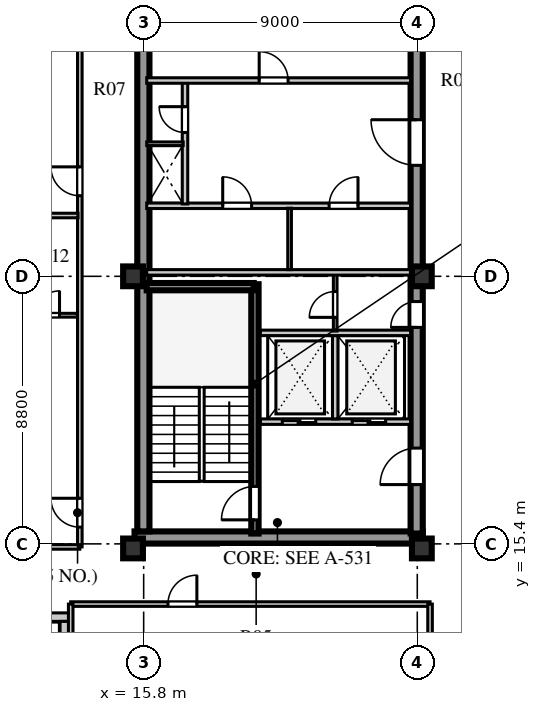
"""IFC4 building model, lengths in metres.
Left out: names, types, materials, properties, quantities, classifications, styles, units other than length and angle.
Written with IfcOpenShell. Run it as: python <this file> out.ifc"""

import sys

from ifc_helpers import new_model, si_unit, direction, frame, frame_2d, origin, origin_2d, place, context, subcontext, project, spatial, rectangle, extrude, element, fill, save


model = new_model("IFC4")
c1 = context("Model", 3, precision=1e-05, world=origin(), true_north=direction((0.0, 1.0)))
c2 = subcontext(c1, "Body", "Model", "MODEL_VIEW")
j1 = project(units=[si_unit("LENGTHUNIT", "METRE"), si_unit("PLANEANGLEUNIT", "RADIAN")], contexts=[c1])
p1 = place(None, origin())
s1 = spatial("IfcSite", under=j1, at=p1, CompositionType="ELEMENT")
p2 = place(p1, origin())
s2 = spatial("IfcBuilding", under=s1, at=p2, CompositionType="ELEMENT")
p3 = place(p2, frame((0.0, 0.0, 237.5)))
s3 = spatial("IfcBuildingStorey", under=s2, at=p3, CompositionType="ELEMENT", Elevation=237.5)
p4 = place(p3, frame((15.5, 15.61, 0.0), z_axis=(0.0, 0.0, 1.0), x_axis=(1.0, 0.0, 0.0)))
e1 = element("IfcWall", 1, at=p4, inside=s3, PredefinedType="SHEAR", context=c2, shape_type="SweptSolid", body=[
    extrude(rectangle(XDim=9.48, YDim=0.4, at=frame_2d((4.74, 0.0))), origin(), (0.0, 0.0, 1.0), 3.66),
])
p5 = place(p3, frame((15.79, 15.81, 0.0), z_axis=(0.0, 0.0, 1.0), x_axis=(0.0, 1.0, 0.0)))
e2 = element("IfcWall", 2, at=p5, inside=s3, PredefinedType="SHEAR", context=c2, shape_type="SweptSolid", body=[
    extrude(rectangle(XDim=25.63, YDim=0.4, at=frame_2d((12.815, 0.0))), origin(), (0.0, 0.0, 1.0), 3.66),
])
p6 = place(p3, frame((24.78, 15.74, 0.0), z_axis=(0.0, 0.0, 1.0), x_axis=(0.0, 1.0, 0.0)))
e3 = element("IfcWall", 3, at=p6, inside=s3, PredefinedType="SHEAR", context=c2, shape_type="SweptSolid", body=[
    extrude(rectangle(XDim=25.76, YDim=0.4, at=frame_2d((12.88, 0.0))), origin(), (0.0, 0.0, 1.0), 3.66),
])
p7 = place(p6, frame((1.61, 0.0, 0.0)))
e4 = element("IfcOpeningElement", 4, at=p7, cuts=e3, PredefinedType="OPENING", context=c2, shape_type="SweptSolid", body=[
    extrude(rectangle(XDim=1.2, YDim=2.1, at=frame_2d((0.6, 1.05))), frame((0.0, 0.21, 0.0), z_axis=(0.0, -1.0, 0.0), x_axis=(1.0, 0.0, 0.0)), (0.0, 0.0, 1.0), 0.42),
])
p8 = place(p6, frame((6.78, 0.0, 0.0)))
e5 = element("IfcOpeningElement", 5, at=p8, cuts=e3, PredefinedType="OPENING", context=c2, shape_type="SweptSolid", body=[
    extrude(rectangle(XDim=0.85, YDim=2.06, at=frame_2d((0.425, 1.03))), frame((0.0, 0.21, 0.0), z_axis=(0.0, -1.0, 0.0), x_axis=(1.0, 0.0, 0.0)), (0.0, 0.0, 1.0), 0.42),
])
p9 = place(p6, frame((12.11, 0.0, 0.0)))
e6 = element("IfcOpeningElement", 6, at=p9, cuts=e3, PredefinedType="OPENING", context=c2, shape_type="SweptSolid", body=[
    extrude(rectangle(XDim=1.5, YDim=2.12, at=frame_2d((0.75, 1.06))), frame((0.0, 0.21, 0.0), z_axis=(0.0, -1.0, 0.0), x_axis=(1.0, 0.0, 0.0)), (0.0, 0.0, 1.0), 0.42),
])
p10 = place(p6, frame((20.11, 0.0, 0.0)))
e7 = element("IfcOpeningElement", 7, at=p10, cuts=e3, PredefinedType="OPENING", context=c2, shape_type="SweptSolid", body=[
    extrude(rectangle(XDim=1.2, YDim=2.12, at=frame_2d((0.6, 1.06))), frame((0.0, 0.21, 0.0), z_axis=(0.0, -1.0, 0.0), x_axis=(1.0, 0.0, 0.0)), (0.0, 0.0, 1.0), 0.42),
])
p11 = place(p6, frame((24.01, 0.0, 0.0)))
e8 = element("IfcOpeningElement", 8, at=p11, cuts=e3, PredefinedType="OPENING", context=c2, shape_type="SweptSolid", body=[
    extrude(rectangle(XDim=0.95, YDim=2.1, at=frame_2d((0.475, 1.05))), frame((0.0, 0.21, 0.0), z_axis=(0.0, -1.0, 0.0), x_axis=(1.0, 0.0, 0.0)), (0.0, 0.0, 1.0), 0.42),
])
for number, where, z_axis, x_axis in (
    (9, (15.45, 15.25, 0.0), (0.0, 0.0, 1.0), (1.0, 0.0, 0.0)),
    (10, (15.45, 24.2, 0.0), (0.0, 0.0, 1.0), (1.0, 0.0, 0.0)),
    (11, (24.95, 15.25, 0.0), (0.0, 0.0, 1.0), (1.0, 0.0, 0.0)),
    (12, (24.95, 24.2, 0.0), (0.0, 0.0, 1.0), (1.0, 0.0, 0.0)),
):
    element("IfcColumn", number, at=place(p3, frame(where, z_axis=z_axis, x_axis=x_axis)), inside=s3, PredefinedType="COLUMN", context=c2, shape_type="SweptSolid", body=[
        extrude(rectangle(XDim=0.65, YDim=0.65, at=origin_2d()), origin(), (0.0, 0.0, 1.0), 3.66),
    ])
p12 = place(p3, frame((7.8, 12.99, 0.0), z_axis=(0.0, 0.0, 1.0), x_axis=(1.0, 0.0, 0.0)))
e13 = element("IfcWall", 13, at=p12, inside=s3, PredefinedType="STANDARD", context=c2, shape_type="SweptSolid", body=[
    extrude(rectangle(XDim=5.53, YDim=0.28, at=frame_2d((2.765, 0.0))), origin(), (0.0, 0.0, 1.0), 3.66),
])
p13 = place(p3, frame((13.19, 12.85, 0.0), z_axis=(0.0, 0.0, 1.0), x_axis=(0.0, -1.0, 0.0)))
e14 = element("IfcWall", 14, at=p13, inside=s3, PredefinedType="STANDARD", context=c2, shape_type="SweptSolid", body=[
    extrude(rectangle(XDim=4.97, YDim=0.28, at=frame_2d((2.485, 0.0))), origin(), (0.0, 0.0, 1.0), 3.66),
])
p14 = place(p3, frame((19.46, 15.74, 0.0), z_axis=(0.0, 0.0, 1.0), x_axis=(0.0, 1.0, 0.0)))
e15 = element("IfcWall", 15, at=p14, inside=s3, PredefinedType="SHEAR", context=c2, shape_type="SweptSolid", body=[
    extrude(rectangle(XDim=8.2, YDim=0.24, at=frame_2d((4.1, 0.0))), origin(), (0.0, 0.0, 1.0), 3.9),
])
p15 = place(p14, frame((0.45, 0.0, 0.0)))
e16 = element("IfcOpeningElement", 16, at=p15, cuts=e15, PredefinedType="OPENING", context=c2, shape_type="SweptSolid", body=[
    extrude(rectangle(XDim=1.1, YDim=2.1, at=frame_2d((0.55, 1.05))), frame((0.0, 0.13, 0.0), z_axis=(0.0, -1.0, 0.0), x_axis=(1.0, 0.0, 0.0)), (0.0, 0.0, 1.0), 0.26),
])
p16 = place(p3, frame((15.9, 23.86, 0.0), z_axis=(0.0, 0.0, 1.0), x_axis=(1.0, 0.0, 0.0)))
e17 = element("IfcWall", 17, at=p16, inside=s3, PredefinedType="SHEAR", context=c2, shape_type="SweptSolid", body=[
    extrude(rectangle(XDim=3.52, YDim=0.24, at=frame_2d((1.76, 0.0))), origin(), (0.0, 0.0, 1.0), 3.9),
])
p17 = place(p3, frame((19.64, 19.42, 0.0), z_axis=(0.0, 0.0, 1.0), x_axis=(1.0, 0.0, 0.0)))
e18 = element("IfcWall", 18, at=p17, inside=s3, PredefinedType="SOLIDWALL", context=c2, shape_type="SweptSolid", body=[
    extrude(rectangle(XDim=4.94, YDim=0.18, at=frame_2d((2.47, 0.0))), origin(), (0.0, 0.0, 1.0), 3.66),
])
p18 = place(p17, frame((0.72, 0.0, 0.0)))
e19 = element("IfcOpeningElement", 19, at=p18, cuts=e18, PredefinedType="OPENING", context=c2, shape_type="SweptSolid", body=[
    extrude(rectangle(XDim=1.1, YDim=2.1, at=frame_2d((0.55, 1.05))), frame((0.0, 0.1, 0.0), z_axis=(0.0, -1.0, 0.0), x_axis=(1.0, 0.0, 0.0)), (0.0, 0.0, 1.0), 0.2),
])
p19 = place(p17, frame((3.02, 0.0, 0.0)))
e20 = element("IfcOpeningElement", 20, at=p19, cuts=e18, PredefinedType="OPENING", context=c2, shape_type="SweptSolid", body=[
    extrude(rectangle(XDim=1.1, YDim=2.1, at=frame_2d((0.55, 1.05))), frame((0.0, 0.1, 0.0), z_axis=(0.0, -1.0, 0.0), x_axis=(1.0, 0.0, 0.0)), (0.0, 0.0, 1.0), 0.2),
])
p20 = place(p3, frame((22.1, 19.51, 0.0), z_axis=(0.0, 0.0, 1.0), x_axis=(0.0, 1.0, 0.0)))
e21 = element("IfcWall", 21, at=p20, inside=s3, PredefinedType="SOLIDWALL", context=c2, shape_type="SweptSolid", body=[
    extrude(rectangle(XDim=2.74, YDim=0.18, at=frame_2d((1.37, 0.0))), origin(), (0.0, 0.0, 1.0), 3.66),
])
p21 = place(p3, frame((19.64, 22.34, 0.0), z_axis=(0.0, 0.0, 1.0), x_axis=(1.0, 0.0, 0.0)))
e22 = element("IfcWall", 22, at=p21, inside=s3, PredefinedType="SOLIDWALL", context=c2, shape_type="SweptSolid", body=[
    extrude(rectangle(XDim=4.94, YDim=0.18, at=frame_2d((2.47, 0.0))), origin(), (0.0, 0.0, 1.0), 3.66),
])
p22 = place(p3, frame((22.1, 22.4, 0.0), z_axis=(0.0, 0.0, 1.0), x_axis=(0.0, 1.0, 0.0)))
e23 = element("IfcWall", 23, at=p22, inside=s3, PredefinedType="PARTITIONING", context=c2, shape_type="SweptSolid", body=[
    extrude(rectangle(XDim=1.88, YDim=0.12, at=frame_2d((0.94, 0.0))), origin(), (0.0, 0.0, 1.0), 3.66),
])
p23 = place(p22, frame((0.45, 0.0, 0.0)))
e24 = element("IfcOpeningElement", 24, at=p23, cuts=e23, PredefinedType="OPENING", context=c2, shape_type="SweptSolid", body=[
    extrude(rectangle(XDim=0.85, YDim=2.06, at=frame_2d((0.425, 1.03))), frame((0.0, 0.07, 0.0), z_axis=(0.0, -1.0, 0.0), x_axis=(1.0, 0.0, 0.0)), (0.0, 0.0, 1.0), 0.14),
])
p24 = place(p3, frame((15.9, 26.52, 0.0), z_axis=(0.0, 0.0, 1.0), x_axis=(1.0, 0.0, 0.0)))
e25 = element("IfcWall", 25, at=p24, inside=s3, PredefinedType="SOLIDWALL", context=c2, shape_type="SweptSolid", body=[
    extrude(rectangle(XDim=8.68, YDim=0.18, at=frame_2d((4.34, 0.0))), origin(), (0.0, 0.0, 1.0), 3.66),
])
p25 = place(p24, frame((2.5, 0.0, 0.0)))
e26 = element("IfcOpeningElement", 26, at=p25, cuts=e25, PredefinedType="OPENING", context=c2, shape_type="SweptSolid", body=[
    extrude(rectangle(XDim=0.95, YDim=2.1, at=frame_2d((0.475, 1.05))), frame((0.0, 0.1, 0.0), z_axis=(0.0, -1.0, 0.0), x_axis=(1.0, 0.0, 0.0)), (0.0, 0.0, 1.0), 0.2),
])
p26 = place(p24, frame((6.0, 0.0, 0.0)))
e27 = element("IfcOpeningElement", 27, at=p26, cuts=e25, PredefinedType="OPENING", context=c2, shape_type="SweptSolid", body=[
    extrude(rectangle(XDim=0.95, YDim=2.1, at=frame_2d((0.475, 1.05))), frame((0.0, 0.1, 0.0), z_axis=(0.0, -1.0, 0.0), x_axis=(1.0, 0.0, 0.0)), (0.0, 0.0, 1.0), 0.2),
])
p27 = place(p3, frame((15.9, 24.33, 0.0), z_axis=(0.0, 0.0, 1.0), x_axis=(1.0, 0.0, 0.0)))
e28 = element("IfcWall", 28, at=p27, inside=s3, PredefinedType="SOLIDWALL", context=c2, shape_type="SweptSolid", body=[
    extrude(rectangle(XDim=8.68, YDim=0.18, at=frame_2d((4.34, 0.0))), origin(), (0.0, 0.0, 1.0), 3.06),
])
p28 = place(p3, frame((20.6, 24.42, 0.0), z_axis=(0.0, 0.0, 1.0), x_axis=(0.0, 1.0, 0.0)))
e29 = element("IfcWall", 29, at=p28, inside=s3, PredefinedType="PARTITIONING", context=c2, shape_type="SweptSolid", body=[
    extrude(rectangle(XDim=2.02, YDim=0.12, at=frame_2d((1.01, 0.0))), origin(), (0.0, 0.0, 1.0), 3.66),
])
p29 = place(p3, frame((17.16, 26.58, 0.0), z_axis=(0.0, 0.0, 1.0), x_axis=(0.0, 1.0, 0.0)))
e30 = element("IfcWall", 30, at=p29, inside=s3, PredefinedType="SOLIDWALL", context=c2, shape_type="SweptSolid", body=[
    extrude(rectangle(XDim=4.02, YDim=0.18, at=frame_2d((2.01, 0.0))), origin(), (0.0, 0.0, 1.0), 3.66),
])
p30 = place(p29, frame((2.35, 0.0, 0.0)))
e31 = element("IfcOpeningElement", 31, at=p30, cuts=e30, PredefinedType="OPENING", context=c2, shape_type="SweptSolid", body=[
    extrude(rectangle(XDim=0.85, YDim=2.06, at=frame_2d((0.425, 1.03))), frame((0.0, 0.1, 0.0), z_axis=(0.0, -1.0, 0.0), x_axis=(1.0, 0.0, 0.0)), (0.0, 0.0, 1.0), 0.2),
])
p31 = place(p3, frame((15.9, 28.56, 0.0), z_axis=(0.0, 0.0, 1.0), x_axis=(1.0, 0.0, 0.0)))
e32 = element("IfcWall", 32, at=p31, inside=s3, PredefinedType="PARTITIONING", context=c2, shape_type="SweptSolid", body=[
    extrude(rectangle(XDim=1.2, YDim=0.12, at=frame_2d((0.6, 0.0))), origin(), (0.0, 0.0, 1.0), 3.66),
])
p32 = place(p3, frame((15.9, 30.64, 0.0), z_axis=(0.0, 0.0, 1.0), x_axis=(1.0, 0.0, 0.0)))
e33 = element("IfcWall", 33, at=p32, inside=s3, PredefinedType="SOLIDWALL", context=c2, shape_type="SweptSolid", body=[
    extrude(rectangle(XDim=8.68, YDim=0.18, at=frame_2d((4.34, 0.0))), origin(), (0.0, 0.0, 1.0), 3.66),
])
p33 = place(p32, frame((3.7, 0.0, 0.0)))
e34 = element("IfcOpeningElement", 34, at=p33, cuts=e33, PredefinedType="OPENING", context=c2, shape_type="SweptSolid", body=[
    extrude(rectangle(XDim=0.95, YDim=2.1, at=frame_2d((0.475, 1.05))), frame((0.0, 0.1, 0.0), z_axis=(0.0, -1.0, 0.0), x_axis=(1.0, 0.0, 0.0)), (0.0, 0.0, 1.0), 0.2),
])
p34 = place(p3, frame((13.4, 13.42, 0.0), z_axis=(0.0, 0.0, 1.0), x_axis=(1.0, 0.0, 0.0)))
e35 = element("IfcWall", 35, at=p34, inside=s3, PredefinedType="PARTITIONING", context=c2, shape_type="SweptSolid", body=[
    extrude(rectangle(XDim=11.82, YDim=0.15, at=frame_2d((5.91, 0.0))), origin(), (0.0, 0.0, 1.0), 3.66),
])
p35 = place(p34, frame((3.2, 0.0, 0.0)))
e36 = element("IfcOpeningElement", 36, at=p35, cuts=e35, PredefinedType="OPENING", context=c2, shape_type="SweptSolid", body=[
    extrude(rectangle(XDim=0.95, YDim=2.08, at=frame_2d((0.475, 1.04))), frame((0.0, 0.085, 0.0), z_axis=(0.0, -1.0, 0.0), x_axis=(1.0, 0.0, 0.0)), (0.0, 0.0, 1.0), 0.17),
])
p36 = place(p3, frame((13.4, 7.88, 0.0), z_axis=(0.0, 0.0, 1.0), x_axis=(0.0, 1.0, 0.0)))
e37 = element("IfcWall", 37, at=p36, inside=s3, PredefinedType="PARTITIONING", context=c2, shape_type="SweptSolid", body=[
    extrude(rectangle(XDim=5.54, YDim=0.15, at=frame_2d((2.77, 0.0))), origin(), (0.0, 0.0, 1.0), 3.66),
])
p37 = place(p3, frame((25.22, 7.88, 0.0), z_axis=(0.0, 0.0, 1.0), x_axis=(0.0, 1.0, 0.0)))
e38 = element("IfcWall", 38, at=p37, inside=s3, PredefinedType="PARTITIONING", context=c2, shape_type="SweptSolid", body=[
    extrude(rectangle(XDim=5.54, YDim=0.15, at=frame_2d((2.77, 0.0))), origin(), (0.0, 0.0, 1.0), 3.21),
])
p38 = place(p3, frame((13.7, 15.3, 0.0), z_axis=(0.0, 0.0, 1.0), x_axis=(0.0, 1.0, 0.0)))
e39 = element("IfcWall", 39, at=p38, inside=s3, PredefinedType="PARTITIONING", context=c2, shape_type="SweptSolid", body=[
    extrude(rectangle(XDim=26.6, YDim=0.15, at=frame_2d((13.3, 0.0))), origin(), (0.0, 0.0, 1.0), 3.66),
])
p39 = place(p38, frame((0.65, 0.0, 0.0)))
e40 = element("IfcOpeningElement", 40, at=p39, cuts=e39, PredefinedType="OPENING", context=c2, shape_type="SweptSolid", body=[
    extrude(rectangle(XDim=0.95, YDim=2.1, at=frame_2d((0.475, 1.05))), frame((0.0, 0.085, 0.0), z_axis=(0.0, -1.0, 0.0), x_axis=(1.0, 0.0, 0.0)), (0.0, 0.0, 1.0), 0.17),
])
p40 = place(p38, frame((11.55, 0.0, 0.0)))
e41 = element("IfcOpeningElement", 41, at=p40, cuts=e39, PredefinedType="OPENING", context=c2, shape_type="SweptSolid", body=[
    extrude(rectangle(XDim=0.95, YDim=2.1, at=frame_2d((0.475, 1.05))), frame((0.0, 0.085, 0.0), z_axis=(0.0, -1.0, 0.0), x_axis=(1.0, 0.0, 0.0)), (0.0, 0.0, 1.0), 0.17),
])
p41 = place(p3, frame((8.08, 15.3, 0.0), z_axis=(0.0, 0.0, 1.0), x_axis=(1.0, 0.0, 0.0)))
e42 = element("IfcWall", 42, at=p41, inside=s3, PredefinedType="PARTITIONING", context=c2, shape_type="SweptSolid", body=[
    extrude(rectangle(XDim=5.62, YDim=0.15, at=frame_2d((2.81, 0.0))), origin(), (0.0, 0.0, 1.0), 3.21),
])
p42 = place(p3, frame((10.45, 22.92, 0.0), z_axis=(0.0, 0.0, 1.0), x_axis=(1.0, 0.0, 0.0)))
e43 = element("IfcWall", 43, at=p42, inside=s3, PredefinedType="PLUMBINGWALL", context=c2, shape_type="SweptSolid", body=[
    extrude(rectangle(XDim=3.17, YDim=0.125, at=frame_2d((1.585, 0.0))), origin(), (0.0, 0.0, 1.0), 3.66),
])
p43 = place(p42, frame((0.16, 0.0, 0.0)))
e44 = element("IfcOpeningElement", 44, at=p43, cuts=e43, PredefinedType="OPENING", context=c2, shape_type="SweptSolid", body=[
    extrude(rectangle(XDim=0.8, YDim=2.05, at=frame_2d((0.4, 1.025))), frame((0.0, 0.073, 0.0), z_axis=(0.0, -1.0, 0.0), x_axis=(1.0, 0.0, 0.0)), (0.0, 0.0, 1.0), 0.145),
])
p44 = place(p42, frame((1.782, 0.0, 0.0)))
e45 = element("IfcOpeningElement", 45, at=p44, cuts=e43, PredefinedType="OPENING", context=c2, shape_type="SweptSolid", body=[
    extrude(rectangle(XDim=0.8, YDim=2.05, at=frame_2d((0.4, 1.025))), frame((0.0, 0.073, 0.0), z_axis=(0.0, -1.0, 0.0), x_axis=(1.0, 0.0, 0.0)), (0.0, 0.0, 1.0), 0.145),
])
p45 = place(p3, frame((8.08, 26.2, 0.0), z_axis=(0.0, 0.0, 1.0), x_axis=(1.0, 0.0, 0.0)))
e46 = element("IfcWall", 46, at=p45, inside=s3, PredefinedType="PARTITIONING", context=c2, shape_type="SweptSolid", body=[
    extrude(rectangle(XDim=5.56, YDim=0.15, at=frame_2d((2.78, 0.0))), origin(), (0.0, 0.0, 1.0), 3.66),
])
p46 = place(p15, origin())
e47 = element("IfcDoor", 47, at=p46, inside=s3, OperationType="SINGLE_SWING_LEFT", PredefinedType="DOOR", context=c2, shape_type="SweptSolid", body=[
    extrude(rectangle(XDim=1.1, YDim=2.1, at=frame_2d((0.55, 1.05))), frame((0.0, 0.025, 0.0), z_axis=(0.0, -1.0, 0.0), x_axis=(1.0, 0.0, 0.0)), (0.0, 0.0, 1.0), 0.05),
])
fill(e16, e47)
p47 = place(p18, origin())
e48 = element("IfcDoor", 48, at=p47, inside=s3, OperationType="DOUBLE_DOOR_SLIDING", PredefinedType="DOOR", context=c2, shape_type="SweptSolid", body=[
    extrude(rectangle(XDim=1.1, YDim=2.1, at=frame_2d((0.55, 1.05))), frame((0.0, 0.025, 0.0), z_axis=(0.0, -1.0, 0.0), x_axis=(1.0, 0.0, 0.0)), (0.0, 0.0, 1.0), 0.05),
])
fill(e19, e48)
p48 = place(p19, origin())
e49 = element("IfcDoor", 49, at=p48, inside=s3, OperationType="DOUBLE_DOOR_SLIDING", PredefinedType="DOOR", context=c2, shape_type="SweptSolid", body=[
    extrude(rectangle(XDim=1.1, YDim=2.1, at=frame_2d((0.55, 1.05))), frame((0.0, 0.025, 0.0), z_axis=(0.0, -1.0, 0.0), x_axis=(1.0, 0.0, 0.0)), (0.0, 0.0, 1.0), 0.05),
])
fill(e20, e49)
p49 = place(p7, frame((1.2, 0.0, 0.0), z_axis=(0.0, 0.0, 1.0), x_axis=(-1.0, 0.0, 0.0)))
e50 = element("IfcDoor", 50, at=p49, inside=s3, OperationType="SINGLE_SWING_RIGHT", PredefinedType="DOOR", context=c2, shape_type="SweptSolid", body=[
    extrude(rectangle(XDim=1.2, YDim=2.1, at=frame_2d((0.6, 1.05))), frame((0.0, 0.025, 0.0), z_axis=(0.0, -1.0, 0.0), x_axis=(1.0, 0.0, 0.0)), (0.0, 0.0, 1.0), 0.05),
])
fill(e4, e50)
p50 = place(p23, origin())
e51 = element("IfcDoor", 51, at=p50, inside=s3, OperationType="SINGLE_SWING_LEFT", PredefinedType="DOOR", context=c2, shape_type="SweptSolid", body=[
    extrude(rectangle(XDim=0.85, YDim=2.06, at=frame_2d((0.425, 1.03))), frame((0.0, 0.025, 0.0), z_axis=(0.0, -1.0, 0.0), x_axis=(1.0, 0.0, 0.0)), (0.0, 0.0, 1.0), 0.05),
])
fill(e24, e51)
p51 = place(p8, frame((0.85, 0.0, 0.0), z_axis=(0.0, 0.0, 1.0), x_axis=(-1.0, 0.0, 0.0)))
e52 = element("IfcDoor", 52, at=p51, inside=s3, OperationType="SINGLE_SWING_RIGHT", PredefinedType="DOOR", context=c2, shape_type="SweptSolid", body=[
    extrude(rectangle(XDim=0.85, YDim=2.06, at=frame_2d((0.425, 1.03))), frame((0.0, 0.025, 0.0), z_axis=(0.0, -1.0, 0.0), x_axis=(1.0, 0.0, 0.0)), (0.0, 0.0, 1.0), 0.05),
])
fill(e5, e52)
p52 = place(p25, origin())
e53 = element("IfcDoor", 53, at=p52, inside=s3, OperationType="SINGLE_SWING_LEFT", PredefinedType="DOOR", context=c2, shape_type="SweptSolid", body=[
    extrude(rectangle(XDim=0.95, YDim=2.1, at=frame_2d((0.475, 1.05))), frame((0.0, 0.025, 0.0), z_axis=(0.0, -1.0, 0.0), x_axis=(1.0, 0.0, 0.0)), (0.0, 0.0, 1.0), 0.05),
])
fill(e26, e53)
p53 = place(p26, origin())
e54 = element("IfcDoor", 54, at=p53, inside=s3, OperationType="SINGLE_SWING_RIGHT", PredefinedType="DOOR", context=c2, shape_type="SweptSolid", body=[
    extrude(rectangle(XDim=0.95, YDim=2.1, at=frame_2d((0.475, 1.05))), frame((0.0, 0.025, 0.0), z_axis=(0.0, -1.0, 0.0), x_axis=(1.0, 0.0, 0.0)), (0.0, 0.0, 1.0), 0.05),
])
fill(e27, e54)
p54 = place(p30, origin())
e55 = element("IfcDoor", 55, at=p54, inside=s3, OperationType="SINGLE_SWING_RIGHT", PredefinedType="DOOR", context=c2, shape_type="SweptSolid", body=[
    extrude(rectangle(XDim=0.85, YDim=2.06, at=frame_2d((0.425, 1.03))), frame((0.0, 0.025, 0.0), z_axis=(0.0, -1.0, 0.0), x_axis=(1.0, 0.0, 0.0)), (0.0, 0.0, 1.0), 0.05),
])
fill(e31, e55)
p55 = place(p9, frame((1.5, 0.0, 0.0), z_axis=(0.0, 0.0, 1.0), x_axis=(-1.0, 0.0, 0.0)))
e56 = element("IfcDoor", 56, at=p55, inside=s3, OperationType="SINGLE_SWING_LEFT", PredefinedType="DOOR", context=c2, shape_type="SweptSolid", body=[
    extrude(rectangle(XDim=1.5, YDim=2.12, at=frame_2d((0.75, 1.06))), frame((0.0, 0.025, 0.0), z_axis=(0.0, -1.0, 0.0), x_axis=(1.0, 0.0, 0.0)), (0.0, 0.0, 1.0), 0.05),
])
fill(e6, e56)
p56 = place(p33, frame((0.95, 0.0, 0.0), z_axis=(0.0, 0.0, 1.0), x_axis=(-1.0, 0.0, 0.0)))
e57 = element("IfcDoor", 57, at=p56, inside=s3, OperationType="SINGLE_SWING_RIGHT", PredefinedType="DOOR", context=c2, shape_type="SweptSolid", body=[
    extrude(rectangle(XDim=0.95, YDim=2.1, at=frame_2d((0.475, 1.05))), frame((0.0, 0.025, 0.0), z_axis=(0.0, -1.0, 0.0), x_axis=(1.0, 0.0, 0.0)), (0.0, 0.0, 1.0), 0.05),
])
fill(e34, e57)
p57 = place(p35, frame((0.95, 0.0, 0.0), z_axis=(0.0, 0.0, 1.0), x_axis=(-1.0, 0.0, 0.0)))
e58 = element("IfcDoor", 58, at=p57, inside=s3, OperationType="SINGLE_SWING_LEFT", PredefinedType="DOOR", context=c2, shape_type="SweptSolid", body=[
    extrude(rectangle(XDim=0.95, YDim=2.08, at=frame_2d((0.475, 1.04))), frame((0.0, 0.025, 0.0), z_axis=(0.0, -1.0, 0.0), x_axis=(1.0, 0.0, 0.0)), (0.0, 0.0, 1.0), 0.05),
])
fill(e36, e58)
p58 = place(p44, origin())
e59 = element("IfcDoor", 59, at=p58, inside=s3, OperationType="SINGLE_SWING_RIGHT", PredefinedType="DOOR", context=c2, shape_type="SweptSolid", body=[
    extrude(rectangle(XDim=0.8, YDim=2.05, at=frame_2d((0.4, 1.025))), frame((0.0, 0.025, 0.0), z_axis=(0.0, -1.0, 0.0), x_axis=(1.0, 0.0, 0.0)), (0.0, 0.0, 1.0), 0.05),
])
fill(e45, e59)
p59 = place(p39, frame((0.95, 0.0, 0.0), z_axis=(0.0, 0.0, 1.0), x_axis=(-1.0, 0.0, 0.0)))
e60 = element("IfcDoor", 60, at=p59, inside=s3, OperationType="SINGLE_SWING_LEFT", PredefinedType="DOOR", context=c2, shape_type="SweptSolid", body=[
    extrude(rectangle(XDim=0.95, YDim=2.1, at=frame_2d((0.475, 1.05))), frame((0.0, 0.025, 0.0), z_axis=(0.0, -1.0, 0.0), x_axis=(1.0, 0.0, 0.0)), (0.0, 0.0, 1.0), 0.05),
])
fill(e40, e60)
p60 = place(p40, frame((0.95, 0.0, 0.0), z_axis=(0.0, 0.0, 1.0), x_axis=(-1.0, 0.0, 0.0)))
e61 = element("IfcDoor", 61, at=p60, inside=s3, OperationType="SINGLE_SWING_LEFT", PredefinedType="DOOR", context=c2, shape_type="SweptSolid", body=[
    extrude(rectangle(XDim=0.95, YDim=2.1, at=frame_2d((0.475, 1.05))), frame((0.0, 0.025, 0.0), z_axis=(0.0, -1.0, 0.0), x_axis=(1.0, 0.0, 0.0)), (0.0, 0.0, 1.0), 0.05),
])
fill(e41, e61)
save(model, sys.argv[1])
